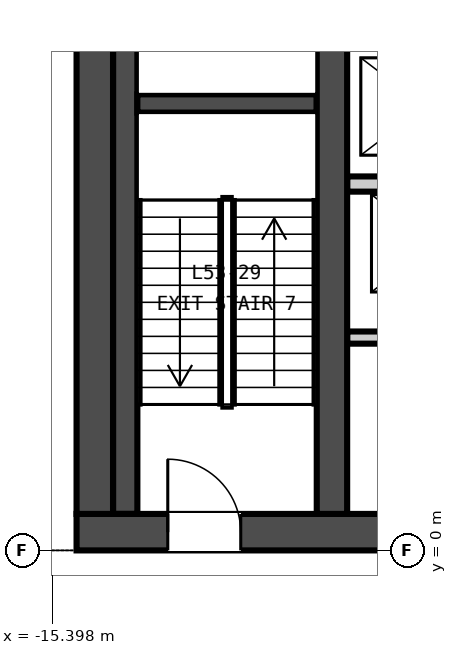
"""IFC4 building model, lengths in metres.
Left out: names, types, materials, properties, quantities, classifications, styles, units other than length and angle.
Written with IfcOpenShell. Run it as: python <this file> out.ifc"""

import sys

from ifc_helpers import new_model, si_unit, direction, frame, frame_2d, origin, place, context, subcontext, project, spatial, rectangle, extrude, element, fill, save


model = new_model("IFC4")
c1 = context("Model", 3, precision=1e-05, world=origin(), true_north=direction((0.0, 1.0)))
c2 = subcontext(c1, "Body", "Model", "MODEL_VIEW")
j1 = project(units=[si_unit("LENGTHUNIT", "METRE"), si_unit("PLANEANGLEUNIT", "RADIAN")], contexts=[c1])
p1 = place(None, origin())
s1 = spatial("IfcSite", under=j1, at=p1, CompositionType="ELEMENT")
p2 = place(p1, origin())
s2 = spatial("IfcBuilding", under=s1, at=p2, CompositionType="ELEMENT")
p3 = place(p2, frame((0.0, 0.0, 211.8)))
s3 = spatial("IfcBuildingStorey", under=s2, at=p3, CompositionType="ELEMENT", Elevation=211.8)
p4 = place(p3, frame((-15.0, 0.3, -0.3), z_axis=(0.0, 0.0, 1.0), x_axis=(1.0, 0.0, 0.0)))
e1 = element("IfcWall", 1, at=p4, inside=s3, PredefinedType="SOLIDWALL", context=c2, shape_type="SweptSolid", body=[
    extrude(rectangle(XDim=30.0, YDim=0.6, at=frame_2d((15.0, 0.0))), origin(), (0.0, 0.0, 1.0), 4.65),
])
p5 = place(p4, frame((5.8, 0.0, 0.3)))
e2 = element("IfcOpeningElement", 2, at=p5, cuts=e1, PredefinedType="OPENING", context=c2, shape_type="SweptSolid", body=[
    extrude(rectangle(XDim=2.4, YDim=2.4, at=frame_2d((1.2, 1.2))), frame((0.0, 0.31, 0.0), z_axis=(0.0, -1.0, 0.0), x_axis=(1.0, 0.0, 0.0)), (0.0, 0.0, 1.0), 0.62),
])
p6 = place(p4, frame((13.8, 0.0, 0.3)))
e3 = element("IfcOpeningElement", 3, at=p6, cuts=e1, PredefinedType="OPENING", context=c2, shape_type="SweptSolid", body=[
    extrude(rectangle(XDim=2.4, YDim=2.4, at=frame_2d((1.2, 1.2))), frame((0.0, 0.31, 0.0), z_axis=(0.0, -1.0, 0.0), x_axis=(1.0, 0.0, 0.0)), (0.0, 0.0, 1.0), 0.62),
])
p7 = place(p4, frame((21.8, 0.0, 0.3)))
e4 = element("IfcOpeningElement", 4, at=p7, cuts=e1, PredefinedType="OPENING", context=c2, shape_type="SweptSolid", body=[
    extrude(rectangle(XDim=2.4, YDim=2.4, at=frame_2d((1.2, 1.2))), frame((0.0, 0.31, 0.0), z_axis=(0.0, -1.0, 0.0), x_axis=(1.0, 0.0, 0.0)), (0.0, 0.0, 1.0), 0.62),
])
p8 = place(p4, frame((1.5, 0.0, 0.3)))
e5 = element("IfcOpeningElement", 5, at=p8, cuts=e1, PredefinedType="OPENING", context=c2, shape_type="SweptSolid", body=[
    extrude(rectangle(XDim=1.2, YDim=2.1, at=frame_2d((0.6, 1.05))), frame((0.0, 0.31, 0.0), z_axis=(0.0, -1.0, 0.0), x_axis=(1.0, 0.0, 0.0)), (0.0, 0.0, 1.0), 0.62),
])
p9 = place(p4, frame((27.3, 0.0, 0.3)))
e6 = element("IfcOpeningElement", 6, at=p9, cuts=e1, PredefinedType="OPENING", context=c2, shape_type="SweptSolid", body=[
    extrude(rectangle(XDim=1.2, YDim=2.1, at=frame_2d((0.6, 1.05))), frame((0.0, 0.31, 0.0), z_axis=(0.0, -1.0, 0.0), x_axis=(1.0, 0.0, 0.0)), (0.0, 0.0, 1.0), 0.62),
])
p10 = place(p3, frame((-14.7, 0.6, -0.3), z_axis=(0.0, 0.0, 1.0), x_axis=(0.0, 1.0, 0.0)))
e7 = element("IfcWall", 7, at=p10, inside=s3, PredefinedType="SOLIDWALL", context=c2, shape_type="SweptSolid", body=[
    extrude(rectangle(XDim=13.8, YDim=0.6, at=frame_2d((6.9, 0.0))), origin(), (0.0, 0.0, 1.0), 4.65),
])
p11 = place(p3, frame((-10.8, 0.6, -0.3), z_axis=(0.0, 0.0, 1.0), x_axis=(0.0, 1.0, 0.0)))
e8 = element("IfcWall", 8, at=p11, inside=s3, PredefinedType="SOLIDWALL", context=c2, shape_type="SweptSolid", body=[
    extrude(rectangle(XDim=13.8, YDim=0.5, at=frame_2d((6.9, 0.0))), origin(), (0.0, 0.0, 1.0), 4.65),
])
p12 = place(p3, frame((-10.55, 3.5, 0.0), z_axis=(0.0, 0.0, 1.0), x_axis=(1.0, 0.0, 0.0)))
e9 = element("IfcWall", 9, at=p12, inside=s3, PredefinedType="PARTITIONING", context=c2, shape_type="SweptSolid", body=[
    extrude(rectangle(XDim=21.1, YDim=0.2, at=frame_2d((10.55, 0.0))), origin(), (0.0, 0.0, 1.0), 4.35),
])
p13 = place(p12, frame((0.675, 0.0, 0.0)))
e10 = element("IfcOpeningElement", 10, at=p13, cuts=e9, PredefinedType="OPENING", context=c2, shape_type="SweptSolid", body=[
    extrude(rectangle(XDim=1.2, YDim=2.1, at=frame_2d((0.6, 1.05))), frame((0.0, 0.11, 0.0), z_axis=(0.0, -1.0, 0.0), x_axis=(1.0, 0.0, 0.0)), (0.0, 0.0, 1.0), 0.22),
])
p14 = place(p12, frame((3.475, 0.0, 0.0)))
e11 = element("IfcOpeningElement", 11, at=p14, cuts=e9, PredefinedType="OPENING", context=c2, shape_type="SweptSolid", body=[
    extrude(rectangle(XDim=1.2, YDim=2.1, at=frame_2d((0.6, 1.05))), frame((0.0, 0.11, 0.0), z_axis=(0.0, -1.0, 0.0), x_axis=(1.0, 0.0, 0.0)), (0.0, 0.0, 1.0), 0.22),
])
p15 = place(p12, frame((6.275, 0.0, 0.0)))
e12 = element("IfcOpeningElement", 12, at=p15, cuts=e9, PredefinedType="OPENING", context=c2, shape_type="SweptSolid", body=[
    extrude(rectangle(XDim=1.2, YDim=2.1, at=frame_2d((0.6, 1.05))), frame((0.0, 0.11, 0.0), z_axis=(0.0, -1.0, 0.0), x_axis=(1.0, 0.0, 0.0)), (0.0, 0.0, 1.0), 0.22),
])
p16 = place(p12, frame((9.075, 0.0, 0.0)))
e13 = element("IfcOpeningElement", 13, at=p16, cuts=e9, PredefinedType="OPENING", context=c2, shape_type="SweptSolid", body=[
    extrude(rectangle(XDim=1.2, YDim=2.1, at=frame_2d((0.6, 1.05))), frame((0.0, 0.11, 0.0), z_axis=(0.0, -1.0, 0.0), x_axis=(1.0, 0.0, 0.0)), (0.0, 0.0, 1.0), 0.22),
])
p17 = place(p12, frame((11.875, 0.0, 0.0)))
e14 = element("IfcOpeningElement", 14, at=p17, cuts=e9, PredefinedType="OPENING", context=c2, shape_type="SweptSolid", body=[
    extrude(rectangle(XDim=1.2, YDim=2.1, at=frame_2d((0.6, 1.05))), frame((0.0, 0.11, 0.0), z_axis=(0.0, -1.0, 0.0), x_axis=(1.0, 0.0, 0.0)), (0.0, 0.0, 1.0), 0.22),
])
p18 = place(p12, frame((14.675, 0.0, 0.0)))
e15 = element("IfcOpeningElement", 15, at=p18, cuts=e9, PredefinedType="OPENING", context=c2, shape_type="SweptSolid", body=[
    extrude(rectangle(XDim=1.2, YDim=2.1, at=frame_2d((0.6, 1.05))), frame((0.0, 0.11, 0.0), z_axis=(0.0, -1.0, 0.0), x_axis=(1.0, 0.0, 0.0)), (0.0, 0.0, 1.0), 0.22),
])
p19 = place(p12, frame((17.475, 0.0, 0.0)))
e16 = element("IfcOpeningElement", 16, at=p19, cuts=e9, PredefinedType="OPENING", context=c2, shape_type="SweptSolid", body=[
    extrude(rectangle(XDim=1.2, YDim=2.1, at=frame_2d((0.6, 1.05))), frame((0.0, 0.11, 0.0), z_axis=(0.0, -1.0, 0.0), x_axis=(1.0, 0.0, 0.0)), (0.0, 0.0, 1.0), 0.22),
])
p20 = place(p12, frame((19.9, 0.0, 0.0)))
e17 = element("IfcOpeningElement", 17, at=p20, cuts=e9, PredefinedType="OPENING", context=c2, shape_type="SweptSolid", body=[
    extrude(rectangle(XDim=0.9, YDim=2.1, at=frame_2d((0.45, 1.05))), frame((0.0, 0.11, 0.0), z_axis=(0.0, -1.0, 0.0), x_axis=(1.0, 0.0, 0.0)), (0.0, 0.0, 1.0), 0.22),
])
p21 = place(p3, frame((-10.55, 6.025, 0.0), z_axis=(0.0, 0.0, 1.0), x_axis=(1.0, 0.0, 0.0)))
e18 = element("IfcWall", 18, at=p21, inside=s3, PredefinedType="PARTITIONING", context=c2, shape_type="SweptSolid", body=[
    extrude(rectangle(XDim=21.1, YDim=0.25, at=frame_2d((10.55, 0.0))), origin(), (0.0, 0.0, 1.0), 4.35),
])
p22 = place(p3, frame((-14.0, 7.35, 0.0), z_axis=(0.0, 0.0, 1.0), x_axis=(1.0, 0.0, 0.0)))
e19 = element("IfcWall", 19, at=p22, inside=s3, PredefinedType="SOLIDWALL", context=c2, shape_type="SweptSolid", body=[
    extrude(rectangle(XDim=2.95, YDim=0.3, at=frame_2d((1.475, 0.0))), origin(), (0.0, 0.0, 1.0), 4.35),
])
p23 = place(p3, frame((-14.2, 0.6, 0.0), z_axis=(0.0, 0.0, 1.0), x_axis=(0.0, 1.0, 0.0)))
e20 = element("IfcWall", 20, at=p23, inside=s3, PredefinedType="SOLIDWALL", context=c2, shape_type="SweptSolid", body=[
    extrude(rectangle(XDim=13.8, YDim=0.4, at=frame_2d((6.9, 0.0))), origin(), (0.0, 0.0, 1.0), 4.35),
])
p24 = place(p8, origin())
e21 = element("IfcDoor", 21, at=p24, inside=s3, OperationType="SINGLE_SWING_LEFT", PredefinedType="DOOR", context=c2, shape_type="SweptSolid", body=[
    extrude(rectangle(XDim=1.2, YDim=2.1, at=frame_2d((0.6, 1.05))), frame((0.0, 0.025, 0.0), z_axis=(0.0, -1.0, 0.0), x_axis=(1.0, 0.0, 0.0)), (0.0, 0.0, 1.0), 0.05),
])
fill(e5, e21)
save(model, sys.argv[1])
